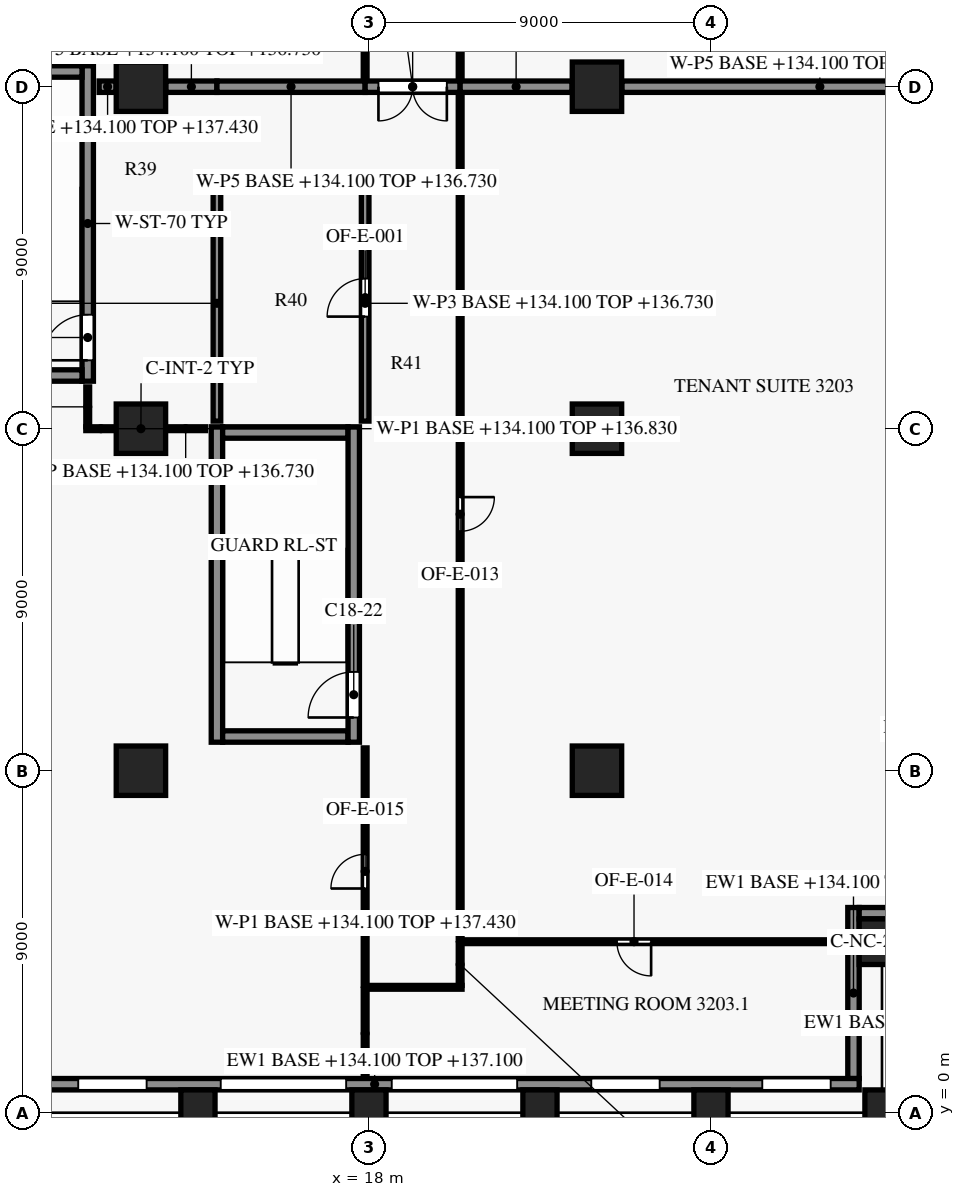
"""IFC4 building model, lengths in metres.
Left out: names, types, materials, properties, quantities, classifications, styles, units other than length and angle.
Written with IfcOpenShell. Run it as: python <this file> out.ifc"""

import sys

from ifc_helpers import new_model, si_unit, direction, frame, frame_2d, origin, origin_2d, place, context, subcontext, project, spatial, rectangle, extrude, element, fill, save


model = new_model("IFC4")
c1 = context("Model", 3, precision=1e-05, world=origin(), true_north=direction((0.0, 1.0)))
c2 = subcontext(c1, "Body", "Model", "MODEL_VIEW")
j1 = project(units=[si_unit("LENGTHUNIT", "METRE"), si_unit("PLANEANGLEUNIT", "RADIAN")], contexts=[c1])
p1 = place(None, origin())
s1 = spatial("IfcSite", under=j1, at=p1, CompositionType="ELEMENT")
p2 = place(p1, origin())
s2 = spatial("IfcBuilding", under=s1, at=p2, CompositionType="ELEMENT")
p3 = place(p2, frame((0.0, 0.0, 134.1)))
s3 = spatial("IfcBuildingStorey", under=s2, at=p3, CompositionType="ELEMENT", Elevation=134.1)
for number, where, z_axis, x_axis in (
    (1, (13.5, 0.0, 0.0), (0.0, 0.0, 1.0), (1.0, 0.0, 0.0)),
    (2, (18.0, 0.0, 0.0), (0.0, 0.0, 1.0), (1.0, 0.0, 0.0)),
    (3, (22.5, 0.0, 0.0), (0.0, 0.0, 1.0), (1.0, 0.0, 0.0)),
    (4, (27.0, 0.0, 0.0), (0.0, 0.0, 1.0), (1.0, 0.0, 0.0)),
    (5, (31.5, 0.0, 0.0), (0.0, 0.0, 1.0), (1.0, 0.0, 0.0)),
):
    element("IfcColumn", number, at=place(p3, frame(where, z_axis=z_axis, x_axis=x_axis)), inside=s3, PredefinedType="COLUMN", context=c2, shape_type="SweptSolid", body=[
        extrude(rectangle(XDim=0.9, YDim=1.2, at=origin_2d()), origin(), (0.0, 0.0, 1.0), 3.8),
    ])
p4 = place(p3, frame((31.5, 4.5, 0.0), z_axis=(0.0, 0.0, 1.0), x_axis=(1.0, 0.0, 0.0)))
e6 = element("IfcColumn", 6, at=p4, inside=s3, PredefinedType="COLUMN", context=c2, shape_type="SweptSolid", body=[
    extrude(rectangle(XDim=1.2, YDim=1.2, at=origin_2d()), origin(), (0.0, 0.0, 1.0), 3.8),
])
for number, where, z_axis, x_axis in (
    (7, (12.0, 9.0, 0.0), (0.0, 0.0, 1.0), (1.0, 0.0, 0.0)),
    (8, (12.0, 18.0, 0.0), (0.0, 0.0, 1.0), (1.0, 0.0, 0.0)),
    (9, (12.0, 27.0, 0.0), (0.0, 0.0, 1.0), (1.0, 0.0, 0.0)),
    (10, (24.0, 9.0, 0.0), (0.0, 0.0, 1.0), (1.0, 0.0, 0.0)),
    (11, (24.0, 18.0, 0.0), (0.0, 0.0, 1.0), (1.0, 0.0, 0.0)),
    (12, (24.0, 27.0, 0.0), (0.0, 0.0, 1.0), (1.0, 0.0, 0.0)),
):
    element("IfcColumn", number, at=place(p3, frame(where, z_axis=z_axis, x_axis=x_axis)), inside=s3, PredefinedType="COLUMN", context=c2, shape_type="SweptSolid", body=[
        extrude(rectangle(XDim=1.3, YDim=1.3, at=origin_2d()), origin(), (0.0, 0.0, 1.0), 3.8),
    ])
p5 = place(p3, frame((30.9, 0.75, 0.0), z_axis=(0.0, 0.0, 1.0), x_axis=(-1.0, 0.0, 0.0)))
e13 = element("IfcWall", 13, at=p5, inside=s3, PredefinedType="SOLIDWALL", context=c2, shape_type="SweptSolid", body=[
    extrude(rectangle(XDim=25.5, YDim=0.3, at=frame_2d((12.75, 0.0))), origin(), (0.0, 0.0, 1.0), 3.0),
])
p6 = place(p5, frame((0.75, 0.0, 0.75)))
e14 = element("IfcOpeningElement", 14, at=p6, cuts=e13, PredefinedType="OPENING", context=c2, shape_type="SweptSolid", body=[
    extrude(rectangle(XDim=1.8, YDim=1.8, at=frame_2d((0.9, 0.9))), frame((0.0, 0.16, 0.0), z_axis=(0.0, -1.0, 0.0), x_axis=(1.0, 0.0, 0.0)), (0.0, 0.0, 1.0), 0.32),
])
p7 = place(p5, frame((5.25, 0.0, 0.75)))
e15 = element("IfcOpeningElement", 15, at=p7, cuts=e13, PredefinedType="OPENING", context=c2, shape_type="SweptSolid", body=[
    extrude(rectangle(XDim=1.8, YDim=1.8, at=frame_2d((0.9, 0.9))), frame((0.0, 0.16, 0.0), z_axis=(0.0, -1.0, 0.0), x_axis=(1.0, 0.0, 0.0)), (0.0, 0.0, 1.0), 0.32),
])
p8 = place(p5, frame((9.0, 0.0, 0.15)))
e16 = element("IfcOpeningElement", 16, at=p8, cuts=e13, PredefinedType="OPENING", context=c2, shape_type="SweptSolid", body=[
    extrude(rectangle(XDim=3.3, YDim=2.4, at=frame_2d((1.65, 1.2))), frame((0.0, 0.16, 0.0), z_axis=(0.0, -1.0, 0.0), x_axis=(1.0, 0.0, 0.0)), (0.0, 0.0, 1.0), 0.32),
])
p9 = place(p5, frame((13.5, 0.0, 0.15)))
e17 = element("IfcOpeningElement", 17, at=p9, cuts=e13, PredefinedType="OPENING", context=c2, shape_type="SweptSolid", body=[
    extrude(rectangle(XDim=3.3, YDim=2.4, at=frame_2d((1.65, 1.2))), frame((0.0, 0.16, 0.0), z_axis=(0.0, -1.0, 0.0), x_axis=(1.0, 0.0, 0.0)), (0.0, 0.0, 1.0), 0.32),
])
p10 = place(p5, frame((18.75, 0.0, 0.75)))
e18 = element("IfcOpeningElement", 18, at=p10, cuts=e13, PredefinedType="OPENING", context=c2, shape_type="SweptSolid", body=[
    extrude(rectangle(XDim=1.8, YDim=1.8, at=frame_2d((0.9, 0.9))), frame((0.0, 0.16, 0.0), z_axis=(0.0, -1.0, 0.0), x_axis=(1.0, 0.0, 0.0)), (0.0, 0.0, 1.0), 0.32),
])
p11 = place(p5, frame((23.25, 0.0, 0.75)))
e19 = element("IfcOpeningElement", 19, at=p11, cuts=e13, PredefinedType="OPENING", context=c2, shape_type="SweptSolid", body=[
    extrude(rectangle(XDim=1.8, YDim=1.8, at=frame_2d((0.9, 0.9))), frame((0.0, 0.16, 0.0), z_axis=(0.0, -1.0, 0.0), x_axis=(1.0, 0.0, 0.0)), (0.0, 0.0, 1.0), 0.32),
])
p12 = place(p3, frame((30.75, 5.4, 0.0), z_axis=(0.0, 0.0, 1.0), x_axis=(0.0, -1.0, 0.0)))
e20 = element("IfcWall", 20, at=p12, inside=s3, PredefinedType="SOLIDWALL", context=c2, shape_type="SweptSolid", body=[
    extrude(rectangle(XDim=4.502, YDim=0.3, at=frame_2d((2.251, 0.0))), origin(), (0.0, 0.0, 1.0), 3.0),
])
p13 = place(p3, frame((35.787, 5.25, 0.0), z_axis=(0.0, 0.0, 1.0), x_axis=(-1.0, 0.0, 0.0)))
e21 = element("IfcWall", 21, at=p13, inside=s3, PredefinedType="SOLIDWALL", context=c2, shape_type="SweptSolid", body=[
    extrude(rectangle(XDim=4.887, YDim=0.3, at=frame_2d((2.444, 0.0))), origin(), (0.0, 0.0, 1.0), 3.0),
])
for number, where, z_axis, x_axis in (
    (22, (14.15, 9.9, 0.0), (0.0, 0.0, 1.0), (1.0, 0.0, 0.0)),
    (23, (14.15, 17.9, 0.0), (0.0, 0.0, 1.0), (1.0, 0.0, 0.0)),
    (24, (7.15, 19.4, 0.0), (0.0, 0.0, 1.0), (1.0, 0.0, 0.0)),
    (25, (7.15, 27.4, 0.0), (0.0, 0.0, 1.0), (1.0, 0.0, 0.0)),
):
    element("IfcWall", number, at=place(p3, frame(where, z_axis=z_axis, x_axis=x_axis)), inside=s3, PredefinedType="SHEAR", context=c2, shape_type="SweptSolid", body=[
        extrude(rectangle(XDim=3.3, YDim=0.3, at=frame_2d((1.65, 0.0))), origin(), (0.0, 0.0, 1.0), 3.5),
    ])
p14 = place(p3, frame((10.6, 19.25, 0.0), z_axis=(0.0, 0.0, 1.0), x_axis=(0.0, 1.0, 0.0)))
e26 = element("IfcWall", 26, at=p14, inside=s3, PredefinedType="SHEAR", context=c2, shape_type="SweptSolid", body=[
    extrude(rectangle(XDim=8.3, YDim=0.3, at=frame_2d((4.15, 0.0))), origin(), (0.0, 0.0, 1.0), 3.5),
])
p15 = place(p14, frame((0.55, 0.0, 0.0)))
e27 = element("IfcOpeningElement", 27, at=p15, cuts=e26, PredefinedType="OPENING", context=c2, shape_type="SweptSolid", body=[
    extrude(rectangle(XDim=1.2, YDim=2.2, at=frame_2d((0.6, 1.1))), frame((0.0, 0.16, 0.0), z_axis=(0.0, -1.0, 0.0), x_axis=(1.0, 0.0, 0.0)), (0.0, 0.0, 1.0), 0.32),
])
p16 = place(p3, frame((14.0, 9.75, 0.0), z_axis=(0.0, 0.0, 1.0), x_axis=(0.0, 1.0, 0.0)))
e28 = element("IfcWall", 28, at=p16, inside=s3, PredefinedType="SHEAR", context=c2, shape_type="SweptSolid", body=[
    extrude(rectangle(XDim=8.3, YDim=0.3, at=frame_2d((4.15, 0.0))), origin(), (0.0, 0.0, 1.0), 3.5),
])
p17 = place(p3, frame((17.6, 9.75, 0.0), z_axis=(0.0, 0.0, 1.0), x_axis=(0.0, 1.0, 0.0)))
e29 = element("IfcWall", 29, at=p17, inside=s3, PredefinedType="SHEAR", context=c2, shape_type="SweptSolid", body=[
    extrude(rectangle(XDim=8.3, YDim=0.3, at=frame_2d((4.15, 0.0))), origin(), (0.0, 0.0, 1.0), 3.5),
])
p18 = place(p17, frame((0.65, 0.0, 0.0)))
e30 = element("IfcOpeningElement", 30, at=p18, cuts=e29, PredefinedType="OPENING", context=c2, shape_type="SweptSolid", body=[
    extrude(rectangle(XDim=1.2, YDim=2.2, at=frame_2d((0.6, 1.1))), frame((0.0, 0.16, 0.0), z_axis=(0.0, -1.0, 0.0), x_axis=(1.0, 0.0, 0.0)), (0.0, 0.0, 1.0), 0.32),
])
p19 = place(p3, frame((17.9, 0.92, 0.0), z_axis=(0.0, 0.0, 1.0), x_axis=(0.0, 1.0, 0.0)))
e31 = element("IfcWall", 31, at=p19, inside=s3, PredefinedType="PARTITIONING", context=c2, shape_type="SweptSolid", body=[
    extrude(rectangle(XDim=2.33, YDim=0.1, at=frame_2d((1.165, 0.0))), origin(), (0.0, 0.0, 1.0), 3.33),
])
p20 = place(p3, frame((20.45, 3.3, 0.0), z_axis=(0.0, 0.0, 1.0), x_axis=(-1.0, 0.0, 0.0)))
e32 = element("IfcWall", 32, at=p20, inside=s3, PredefinedType="PARTITIONING", context=c2, shape_type="SweptSolid", body=[
    extrude(rectangle(XDim=2.5, YDim=0.1, at=frame_2d((1.25, 0.0))), origin(), (0.0, 0.0, 1.0), 3.33),
])
p21 = place(p3, frame((17.9, 3.35, 0.0), z_axis=(0.0, 0.0, 1.0), x_axis=(0.0, 1.0, 0.0)))
e33 = element("IfcWall", 33, at=p21, inside=s3, PredefinedType="PARTITIONING", context=c2, shape_type="SweptSolid", body=[
    extrude(rectangle(XDim=6.25, YDim=0.1, at=frame_2d((3.125, 0.0))), origin(), (0.0, 0.0, 1.0), 2.63),
])
p22 = place(p21, frame((2.55, 0.0, 0.0)))
e34 = element("IfcOpeningElement", 34, at=p22, cuts=e33, PredefinedType="OPENING", context=c2, shape_type="SweptSolid", body=[
    extrude(rectangle(XDim=0.9, YDim=2.1, at=frame_2d((0.45, 1.05))), frame((0.0, 0.06, 0.0), z_axis=(0.0, -1.0, 0.0), x_axis=(1.0, 0.0, 0.0)), (0.0, 0.0, 1.0), 0.12),
])
p23 = place(p3, frame((20.4, 4.45, 0.0), z_axis=(0.0, 0.0, 1.0), x_axis=(0.0, -1.0, 0.0)))
e35 = element("IfcWall", 35, at=p23, inside=s3, PredefinedType="PARTITIONING", context=c2, shape_type="SweptSolid", body=[
    extrude(rectangle(XDim=1.1, YDim=0.1, at=frame_2d((0.55, 0.0))), origin(), (0.0, 0.0, 1.0), 3.33),
])
p24 = place(p3, frame((30.58, 4.5, 0.0), z_axis=(0.0, 0.0, 1.0), x_axis=(-1.0, 0.0, 0.0)))
e36 = element("IfcWall", 36, at=p24, inside=s3, PredefinedType="PARTITIONING", context=c2, shape_type="SweptSolid", body=[
    extrude(rectangle(XDim=10.13, YDim=0.1, at=frame_2d((5.065, 0.0))), origin(), (0.0, 0.0, 1.0), 2.63),
])
p25 = place(p24, frame((5.155, 0.0, 0.0)))
e37 = element("IfcOpeningElement", 37, at=p25, cuts=e36, PredefinedType="OPENING", context=c2, shape_type="SweptSolid", body=[
    extrude(rectangle(XDim=0.9, YDim=2.1, at=frame_2d((0.45, 1.05))), frame((0.0, 0.06, 0.0), z_axis=(0.0, -1.0, 0.0), x_axis=(1.0, 0.0, 0.0)), (0.0, 0.0, 1.0), 0.12),
])
p26 = place(p3, frame((11.345, 18.0, 0.0), z_axis=(0.0, 0.0, 1.0), x_axis=(-1.0, 0.0, 0.0)))
e38 = element("IfcWall", 38, at=p26, inside=s3, PredefinedType="PARTITIONING", context=c2, shape_type="SweptSolid", body=[
    extrude(rectangle(XDim=0.795, YDim=0.1, at=frame_2d((0.397, 0.0))), origin(), (0.0, 0.0, 1.0), 2.73),
])
p27 = place(p3, frame((13.7, 18.0, 0.0), z_axis=(0.0, 0.0, 1.0), x_axis=(-1.0, 0.0, 0.0)))
e39 = element("IfcWall", 39, at=p27, inside=s3, PredefinedType="PARTITIONING", context=c2, shape_type="SweptSolid", body=[
    extrude(rectangle(XDim=1.045, YDim=0.1, at=frame_2d((0.522, 0.0))), origin(), (0.0, 0.0, 1.0), 2.63),
])
p28 = place(p3, frame((10.6, 18.05, 0.0), z_axis=(0.0, 0.0, 1.0), x_axis=(0.0, 1.0, 0.0)))
e40 = element("IfcWall", 40, at=p28, inside=s3, PredefinedType="PARTITIONING", context=c2, shape_type="SweptSolid", body=[
    extrude(rectangle(XDim=1.05, YDim=0.1, at=frame_2d((0.525, 0.0))), origin(), (0.0, 0.0, 1.0), 2.73),
])
p29 = place(p3, frame((17.9, 18.2, 0.0), z_axis=(0.0, 0.0, 1.0), x_axis=(0.0, 1.0, 0.0)))
e41 = element("IfcWall", 41, at=p29, inside=s3, PredefinedType="PARTITIONING", context=c2, shape_type="SweptSolid", body=[
    extrude(rectangle(XDim=6.2, YDim=0.2, at=frame_2d((3.1, 0.0))), origin(), (0.0, 0.0, 1.0), 2.63),
])
p30 = place(p29, frame((2.75, 0.0, 0.0)))
e42 = element("IfcOpeningElement", 42, at=p30, cuts=e41, PredefinedType="OPENING", context=c2, shape_type="SweptSolid", body=[
    extrude(rectangle(XDim=1.0, YDim=2.1, at=frame_2d((0.5, 1.05))), frame((0.0, 0.11, 0.0), z_axis=(0.0, -1.0, 0.0), x_axis=(1.0, 0.0, 0.0)), (0.0, 0.0, 1.0), 0.22),
])
p31 = place(p3, frame((14.0, 24.4, 0.0), z_axis=(0.0, 0.0, 1.0), x_axis=(0.0, -1.0, 0.0)))
e43 = element("IfcWall", 43, at=p31, inside=s3, PredefinedType="PARTITIONING", context=c2, shape_type="SweptSolid", body=[
    extrude(rectangle(XDim=6.2, YDim=0.2, at=frame_2d((3.1, 0.0))), origin(), (0.0, 0.0, 1.0), 3.33),
])
p32 = place(p3, frame((18.0, 24.5, 0.0), z_axis=(0.0, 0.0, 1.0), x_axis=(-1.0, 0.0, 0.0)))
e44 = element("IfcWall", 44, at=p32, inside=s3, PredefinedType="PARTITIONING", context=c2, shape_type="SweptSolid", body=[
    extrude(rectangle(XDim=4.1, YDim=0.2, at=frame_2d((2.05, 0.0))), origin(), (0.0, 0.0, 1.0), 2.63),
])
p33 = place(p3, frame((20.4, 26.83, 0.0), z_axis=(0.0, 0.0, 1.0), x_axis=(0.0, -1.0, 0.0)))
e45 = element("IfcWall", 45, at=p33, inside=s3, PredefinedType="PARTITIONING", context=c2, shape_type="SweptSolid", body=[
    extrude(rectangle(XDim=22.28, YDim=0.1, at=frame_2d((11.14, 0.0))), origin(), (0.0, 0.0, 1.0), 2.63),
])
p34 = place(p33, frame((10.63, 0.0, 0.0)))
e46 = element("IfcOpeningElement", 46, at=p34, cuts=e45, PredefinedType="OPENING", context=c2, shape_type="SweptSolid", body=[
    extrude(rectangle(XDim=0.9, YDim=2.1, at=frame_2d((0.45, 1.05))), frame((0.0, 0.06, 0.0), z_axis=(0.0, -1.0, 0.0), x_axis=(1.0, 0.0, 0.0)), (0.0, 0.0, 1.0), 0.12),
])
p35 = place(p3, frame((10.9, 27.0, 0.0), z_axis=(0.0, 0.0, 1.0), x_axis=(1.0, 0.0, 0.0)))
e47 = element("IfcWall", 47, at=p35, inside=s3, PredefinedType="PARTITIONING", context=c2, shape_type="SweptSolid", body=[
    extrude(rectangle(XDim=0.445, YDim=0.3, at=frame_2d((0.223, 0.0))), origin(), (0.0, 0.0, 1.0), 3.33),
])
p36 = place(p3, frame((12.655, 27.0, 0.0), z_axis=(0.0, 0.0, 1.0), x_axis=(1.0, 0.0, 0.0)))
e48 = element("IfcWall", 48, at=p36, inside=s3, PredefinedType="PARTITIONING", context=c2, shape_type="SweptSolid", body=[
    extrude(rectangle(XDim=1.345, YDim=0.3, at=frame_2d((0.672, 0.0))), origin(), (0.0, 0.0, 1.0), 2.63),
])
p37 = place(p3, frame((14.0, 27.0, 0.0), z_axis=(0.0, 0.0, 1.0), x_axis=(1.0, 0.0, 0.0)))
e49 = element("IfcWall", 49, at=p37, inside=s3, PredefinedType="PARTITIONING", context=c2, shape_type="SweptSolid", body=[
    extrude(rectangle(XDim=3.9, YDim=0.3, at=frame_2d((1.95, 0.0))), origin(), (0.0, 0.0, 1.0), 2.63),
])
p38 = place(p3, frame((20.4, 27.0, 0.0), z_axis=(0.0, 0.0, 1.0), x_axis=(-1.0, 0.0, 0.0)))
e50 = element("IfcWall", 50, at=p38, inside=s3, PredefinedType="PARTITIONING", context=c2, shape_type="SweptSolid", body=[
    extrude(rectangle(XDim=2.5, YDim=0.3, at=frame_2d((1.25, 0.0))), origin(), (0.0, 0.0, 1.0), 2.63),
])
p39 = place(p38, frame((0.35, 0.0, 0.0)))
e51 = element("IfcOpeningElement", 51, at=p39, cuts=e50, PredefinedType="OPENING", context=c2, shape_type="SweptSolid", body=[
    extrude(rectangle(XDim=1.8, YDim=2.1, at=frame_2d((0.9, 1.05))), frame((0.0, 0.16, 0.0), z_axis=(0.0, -1.0, 0.0), x_axis=(1.0, 0.0, 0.0)), (0.0, 0.0, 1.0), 0.32),
])
p40 = place(p3, frame((20.4, 27.0, 0.0), z_axis=(0.0, 0.0, 1.0), x_axis=(1.0, 0.0, 0.0)))
e52 = element("IfcWall", 52, at=p40, inside=s3, PredefinedType="PARTITIONING", context=c2, shape_type="SweptSolid", body=[
    extrude(rectangle(XDim=2.945, YDim=0.3, at=frame_2d((1.473, 0.0))), origin(), (0.0, 0.0, 1.0), 2.63),
])
p41 = place(p3, frame((24.655, 27.0, 0.0), z_axis=(0.0, 0.0, 1.0), x_axis=(1.0, 0.0, 0.0)))
e53 = element("IfcWall", 53, at=p41, inside=s3, PredefinedType="PARTITIONING", context=c2, shape_type="SweptSolid", body=[
    extrude(rectangle(XDim=10.42, YDim=0.3, at=frame_2d((5.21, 0.0))), origin(), (0.0, 0.0, 1.0), 2.63),
])
for number, where, z_axis, x_axis in (
    (54, (17.9, 27.17, 0.0), (0.0, 0.0, 1.0), (0.0, 1.0, 0.0)),
    (55, (20.4, 33.45, 0.0), (0.0, 0.0, 1.0), (0.0, -1.0, 0.0)),
):
    element("IfcWall", number, at=place(p3, frame(where, z_axis=z_axis, x_axis=x_axis)), inside=s3, PredefinedType="PARTITIONING", context=c2, shape_type="SweptSolid", body=[
        extrude(rectangle(XDim=6.28, YDim=0.1, at=frame_2d((3.14, 0.0))), origin(), (0.0, 0.0, 1.0), 2.63),
    ])
p42 = place(p6, origin())
e56 = element("IfcWindow", 56, at=p42, inside=s3, PartitioningType="SINGLE_PANEL", PredefinedType="WINDOW", context=c2, shape_type="SweptSolid", body=[
    extrude(rectangle(XDim=1.8, YDim=1.8, at=frame_2d((0.9, 0.9))), frame((0.0, 0.03, 0.0), z_axis=(0.0, -1.0, 0.0), x_axis=(1.0, 0.0, 0.0)), (0.0, 0.0, 1.0), 0.06),
])
fill(e14, e56)
p43 = place(p7, origin())
e57 = element("IfcWindow", 57, at=p43, inside=s3, PartitioningType="SINGLE_PANEL", PredefinedType="WINDOW", context=c2, shape_type="SweptSolid", body=[
    extrude(rectangle(XDim=1.8, YDim=1.8, at=frame_2d((0.9, 0.9))), frame((0.0, 0.03, 0.0), z_axis=(0.0, -1.0, 0.0), x_axis=(1.0, 0.0, 0.0)), (0.0, 0.0, 1.0), 0.06),
])
fill(e15, e57)
p44 = place(p8, origin())
e58 = element("IfcWindow", 58, at=p44, inside=s3, PartitioningType="SINGLE_PANEL", PredefinedType="WINDOW", context=c2, shape_type="SweptSolid", body=[
    extrude(rectangle(XDim=3.3, YDim=2.4, at=frame_2d((1.65, 1.2))), frame((0.0, 0.03, 0.0), z_axis=(0.0, -1.0, 0.0), x_axis=(1.0, 0.0, 0.0)), (0.0, 0.0, 1.0), 0.06),
])
fill(e16, e58)
p45 = place(p9, origin())
e59 = element("IfcWindow", 59, at=p45, inside=s3, PartitioningType="SINGLE_PANEL", PredefinedType="WINDOW", context=c2, shape_type="SweptSolid", body=[
    extrude(rectangle(XDim=3.3, YDim=2.4, at=frame_2d((1.65, 1.2))), frame((0.0, 0.03, 0.0), z_axis=(0.0, -1.0, 0.0), x_axis=(1.0, 0.0, 0.0)), (0.0, 0.0, 1.0), 0.06),
])
fill(e17, e59)
p46 = place(p10, origin())
e60 = element("IfcWindow", 60, at=p46, inside=s3, PartitioningType="SINGLE_PANEL", PredefinedType="WINDOW", context=c2, shape_type="SweptSolid", body=[
    extrude(rectangle(XDim=1.8, YDim=1.8, at=frame_2d((0.9, 0.9))), frame((0.0, 0.03, 0.0), z_axis=(0.0, -1.0, 0.0), x_axis=(1.0, 0.0, 0.0)), (0.0, 0.0, 1.0), 0.06),
])
fill(e18, e60)
p47 = place(p15, origin())
e61 = element("IfcDoor", 61, at=p47, inside=s3, OperationType="SINGLE_SWING_RIGHT", PredefinedType="DOOR", context=c2, shape_type="SweptSolid", body=[
    extrude(rectangle(XDim=1.2, YDim=2.2, at=frame_2d((0.6, 1.1))), frame((0.0, 0.025, 0.0), z_axis=(0.0, -1.0, 0.0), x_axis=(1.0, 0.0, 0.0)), (0.0, 0.0, 1.0), 0.05),
])
fill(e27, e61)
p48 = place(p18, origin())
e62 = element("IfcDoor", 62, at=p48, inside=s3, OperationType="SINGLE_SWING_LEFT", PredefinedType="DOOR", context=c2, shape_type="SweptSolid", body=[
    extrude(rectangle(XDim=1.2, YDim=2.2, at=frame_2d((0.6, 1.1))), frame((0.0, 0.025, 0.0), z_axis=(0.0, -1.0, 0.0), x_axis=(1.0, 0.0, 0.0)), (0.0, 0.0, 1.0), 0.05),
])
fill(e30, e62)
p49 = place(p30, origin())
e63 = element("IfcDoor", 63, at=p49, inside=s3, OperationType="SINGLE_SWING_LEFT", PredefinedType="DOOR", context=c2, shape_type="SweptSolid", body=[
    extrude(rectangle(XDim=1.0, YDim=2.1, at=frame_2d((0.5, 1.05))), frame((0.0, 0.025, 0.0), z_axis=(0.0, -1.0, 0.0), x_axis=(1.0, 0.0, 0.0)), (0.0, 0.0, 1.0), 0.05),
])
fill(e42, e63)
p50 = place(p34, origin())
e64 = element("IfcDoor", 64, at=p50, inside=s3, OperationType="SINGLE_SWING_LEFT", PredefinedType="DOOR", context=c2, shape_type="SweptSolid", body=[
    extrude(rectangle(XDim=0.9, YDim=2.1, at=frame_2d((0.45, 1.05))), frame((0.0, 0.025, 0.0), z_axis=(0.0, -1.0, 0.0), x_axis=(1.0, 0.0, 0.0)), (0.0, 0.0, 1.0), 0.05),
])
fill(e46, e64)
p51 = place(p25, origin())
e65 = element("IfcDoor", 65, at=p51, inside=s3, OperationType="SINGLE_SWING_LEFT", PredefinedType="DOOR", context=c2, shape_type="SweptSolid", body=[
    extrude(rectangle(XDim=0.9, YDim=2.1, at=frame_2d((0.45, 1.05))), frame((0.0, 0.025, 0.0), z_axis=(0.0, -1.0, 0.0), x_axis=(1.0, 0.0, 0.0)), (0.0, 0.0, 1.0), 0.05),
])
fill(e37, e65)
p52 = place(p22, origin())
e66 = element("IfcDoor", 66, at=p52, inside=s3, OperationType="SINGLE_SWING_LEFT", PredefinedType="DOOR", context=c2, shape_type="SweptSolid", body=[
    extrude(rectangle(XDim=0.9, YDim=2.1, at=frame_2d((0.45, 1.05))), frame((0.0, 0.025, 0.0), z_axis=(0.0, -1.0, 0.0), x_axis=(1.0, 0.0, 0.0)), (0.0, 0.0, 1.0), 0.05),
])
fill(e34, e66)
p53 = place(p39, origin())
e67 = element("IfcDoor", 67, at=p53, inside=s3, OperationType="DOUBLE_DOOR_SINGLE_SWING", PredefinedType="DOOR", context=c2, shape_type="SweptSolid", body=[
    extrude(rectangle(XDim=1.8, YDim=2.1, at=frame_2d((0.9, 1.05))), frame((0.0, 0.025, 0.0), z_axis=(0.0, -1.0, 0.0), x_axis=(1.0, 0.0, 0.0)), (0.0, 0.0, 1.0), 0.05),
])
fill(e51, e67)
save(model, sys.argv[1])
